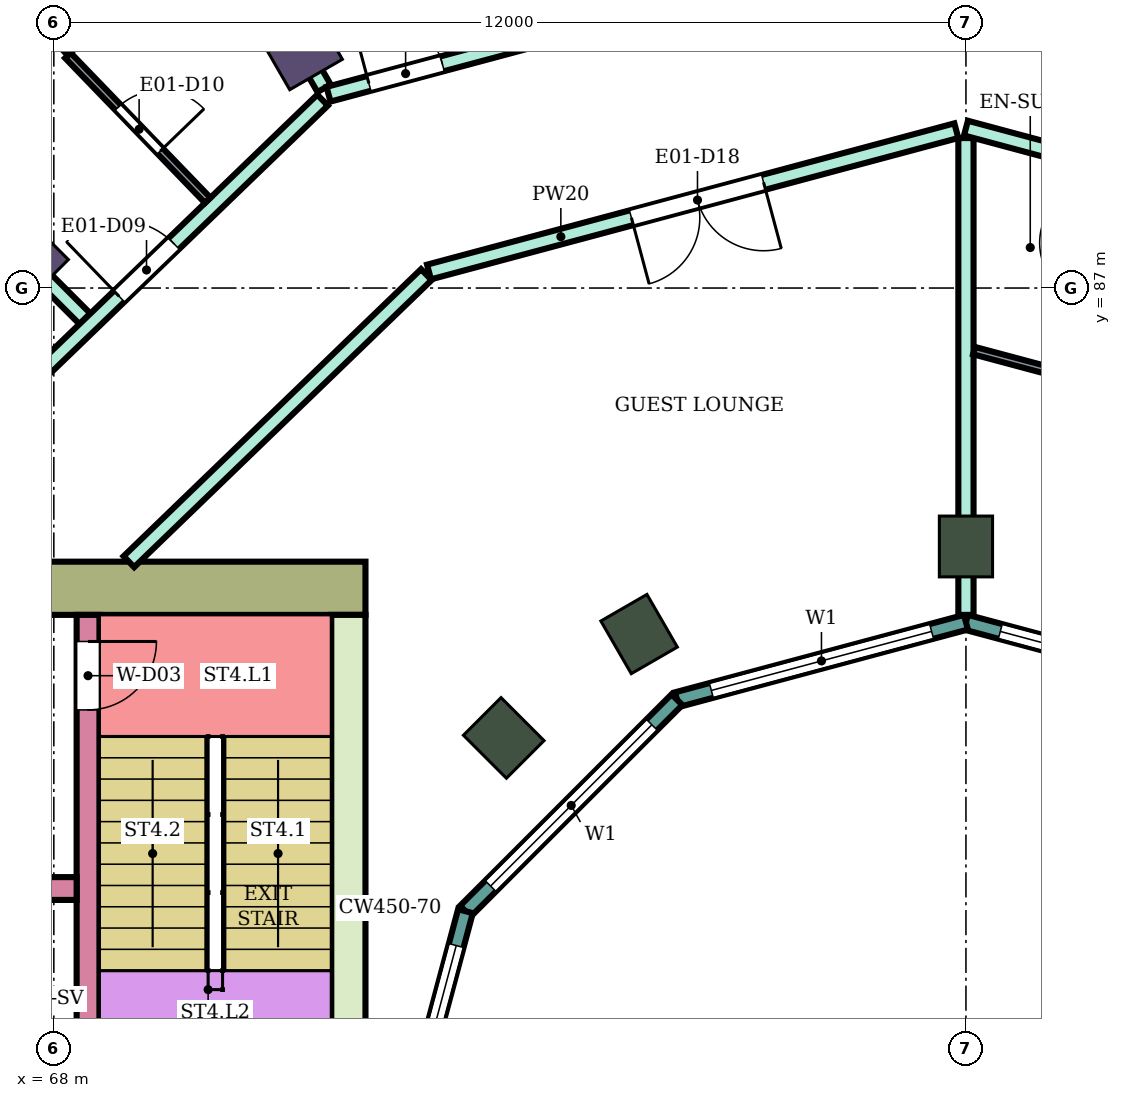
"""IFC4 building model, lengths in metres.
Left out: names, types, materials, properties, quantities, classifications, styles, units other than length and angle.
Written with IfcOpenShell. Run it as: python <this file> out.ifc"""

import sys

from ifc_helpers import new_model, si_unit, direction, frame, frame_2d, origin, origin_2d, place, context, subcontext, project, spatial, rectangle, extrude, element, fill, save


model = new_model("IFC4")
c1 = context("Model", 3, precision=1e-05, world=origin(), true_north=direction((0.0, 1.0)))
c2 = subcontext(c1, "Body", "Model", "MODEL_VIEW")
j1 = project(units=[si_unit("LENGTHUNIT", "METRE"), si_unit("PLANEANGLEUNIT", "RADIAN")], contexts=[c1])
p1 = place(None, origin())
s1 = spatial("IfcSite", under=j1, at=p1, CompositionType="ELEMENT")
p2 = place(p1, origin())
s2 = spatial("IfcBuilding", under=s1, at=p2, CompositionType="ELEMENT")
p3 = place(p2, frame((0.0, 0.0, 118.5)))
s3 = spatial("IfcBuildingStorey", under=s2, at=p3, CompositionType="ELEMENT", Elevation=118.5)
for number, where, z_axis, x_axis in (
    (1, (71.2, 90.242, 0.0), (0.0, 0.0, 1.0), (-0.5, 0.866, 0.0)),
    (2, (67.555, 87.445, 0.0), (0.0, 0.0, 1.0), (-0.707, 0.707, 0.0)),
):
    element("IfcColumn", number, at=place(p3, frame(where, z_axis=z_axis, x_axis=x_axis)), inside=s3, PredefinedType="COLUMN", context=c2, shape_type="SweptSolid", body=[
        extrude(rectangle(XDim=1.0, YDim=0.8, at=origin_2d()), origin(), (0.0, 0.0, 1.0), 3.9),
    ])
for number, where, z_axis, x_axis in (
    (3, (80.0, 83.6, 0.0), (0.0, 0.0, 1.0), (0.0, 1.0, 0.0)),
    (4, (75.7, 82.448, 0.0), (0.0, 0.0, 1.0), (-0.5, 0.866, 0.0)),
    (5, (73.919, 81.081, 0.0), (0.0, 0.0, 1.0), (-0.707, 0.707, 0.0)),
):
    element("IfcColumn", number, at=place(p3, frame(where, z_axis=z_axis, x_axis=x_axis)), inside=s3, PredefinedType="COLUMN", context=c2, shape_type="SweptSolid", body=[
        extrude(rectangle(XDim=0.8, YDim=0.7, at=origin_2d()), origin(), (0.0, 0.0, 1.0), 3.9),
    ])
p4 = place(p3, frame((72.1, 83.05, 0.0), z_axis=(0.0, 0.0, 1.0), x_axis=(-1.0, 0.0, 0.0)))
e6 = element("IfcWall", 6, at=p4, inside=s3, PredefinedType="SHEAR", context=c2, shape_type="SweptSolid", body=[
    extrude(rectangle(XDim=14.8, YDim=0.7, at=frame_2d((7.4, 0.0))), origin(), (0.0, 0.0, 1.0), 3.58),
])
p5 = place(p4, frame((4.2, 0.0, 0.0)))
e7 = element("IfcOpeningElement", 7, at=p5, cuts=e6, PredefinedType="OPENING", context=c2, shape_type="SweptSolid", body=[
    extrude(rectangle(XDim=2.4, YDim=2.4, at=frame_2d((1.2, 1.2))), frame((0.0, 0.36, 0.0), z_axis=(0.0, -1.0, 0.0), x_axis=(1.0, 0.0, 0.0)), (0.0, 0.0, 1.0), 0.72),
])
p6 = place(p3, frame((71.875, 82.7, 0.0), z_axis=(0.0, 0.0, 1.0), x_axis=(0.0, -1.0, 0.0)))
e8 = element("IfcWall", 8, at=p6, inside=s3, PredefinedType="SHEAR", context=c2, shape_type="SweptSolid", body=[
    extrude(rectangle(XDim=7.7, YDim=0.45, at=frame_2d((3.85, 0.0))), origin(), (0.0, 0.0, 1.0), 3.58),
])
p7 = place(p3, frame((68.45, 82.7, 0.0), z_axis=(0.0, 0.0, 1.0), x_axis=(0.0, -1.0, 0.0)))
e9 = element("IfcWall", 9, at=p7, inside=s3, PredefinedType="SHEAR", context=c2, shape_type="SweptSolid", body=[
    extrude(rectangle(XDim=7.7, YDim=0.3, at=frame_2d((3.85, 0.0))), origin(), (0.0, 0.0, 1.0), 3.58),
])
p8 = place(p7, frame((0.35, 0.0, 0.0)))
e10 = element("IfcOpeningElement", 10, at=p8, cuts=e9, PredefinedType="OPENING", context=c2, shape_type="SweptSolid", body=[
    extrude(rectangle(XDim=0.9, YDim=2.1, at=frame_2d((0.45, 1.05))), frame((0.0, 0.16, 0.0), z_axis=(0.0, -1.0, 0.0), x_axis=(1.0, 0.0, 0.0)), (0.0, 0.0, 1.0), 0.32),
])
p9 = place(p3, frame((68.3, 79.1, 0.0), z_axis=(0.0, 0.0, 1.0), x_axis=(-1.0, 0.0, 0.0)))
e11 = element("IfcWall", 11, at=p9, inside=s3, PredefinedType="SHEAR", context=c2, shape_type="SweptSolid", body=[
    extrude(rectangle(XDim=11.0, YDim=0.3, at=frame_2d((5.5, 0.0))), origin(), (0.0, 0.0, 1.0), 3.58),
])
p10 = place(p9, frame((0.4, 0.0, 0.0)))
e12 = element("IfcOpeningElement", 12, at=p10, cuts=e11, PredefinedType="OPENING", context=c2, shape_type="SweptSolid", body=[
    extrude(rectangle(XDim=1.4, YDim=2.1, at=frame_2d((0.7, 1.05))), frame((0.0, 0.16, 0.0), z_axis=(0.0, -1.0, 0.0), x_axis=(1.0, 0.0, 0.0)), (0.0, 0.0, 1.0), 0.32),
])
p11 = place(p9, frame((5.4, 0.0, 0.0)))
e13 = element("IfcOpeningElement", 13, at=p11, cuts=e11, PredefinedType="OPENING", context=c2, shape_type="SweptSolid", body=[
    extrude(rectangle(XDim=1.4, YDim=2.1, at=frame_2d((0.7, 1.05))), frame((0.0, 0.16, 0.0), z_axis=(0.0, -1.0, 0.0), x_axis=(1.0, 0.0, 0.0)), (0.0, 0.0, 1.0), 0.32),
])
p12 = place(p9, frame((8.1, 0.0, 0.0)))
e14 = element("IfcOpeningElement", 14, at=p12, cuts=e11, PredefinedType="OPENING", context=c2, shape_type="SweptSolid", body=[
    extrude(rectangle(XDim=1.0, YDim=2.1, at=frame_2d((0.5, 1.05))), frame((0.0, 0.16, 0.0), z_axis=(0.0, -1.0, 0.0), x_axis=(1.0, 0.0, 0.0)), (0.0, 0.0, 1.0), 0.32),
])
p13 = place(p3, frame((83.802, 81.585, 0.0), z_axis=(0.0, 0.0, 1.0), x_axis=(-0.965933654434, 0.258789828301, 0.0)))
e15 = element("IfcWall", 15, at=p13, inside=s3, PredefinedType="NOTDEFINED", context=c2, shape_type="SweptSolid", body=[
    extrude(rectangle(XDim=3.936, YDim=0.2, at=frame_2d((1.968, 0.0))), origin(), (0.0, 0.0, 1.0), 3.9),
])
p14 = place(p13, frame((0.468, 0.0, 0.9)))
e16 = element("IfcOpeningElement", 16, at=p14, cuts=e15, PredefinedType="OPENING", context=c2, shape_type="SweptSolid", body=[
    extrude(rectangle(XDim=3.0, YDim=2.3, at=frame_2d((1.5, 1.15))), frame((0.0, 0.11, 0.0), z_axis=(0.0, -1.0, 0.0), x_axis=(1.0, 0.0, 0.0)), (0.0, 0.0, 1.0), 0.22),
])
p15 = place(p3, frame((80.0, 82.604, 0.0), z_axis=(0.0, 0.0, 1.0), x_axis=(-0.965933654434, -0.258789828301, 0.0)))
e17 = element("IfcWall", 17, at=p15, inside=s3, PredefinedType="NOTDEFINED", context=c2, shape_type="SweptSolid", body=[
    extrude(rectangle(XDim=3.936, YDim=0.2, at=frame_2d((1.968, 0.0))), origin(), (0.0, 0.0, 1.0), 3.9),
])
p16 = place(p15, frame((0.468, 0.0, 0.9)))
e18 = element("IfcOpeningElement", 18, at=p16, cuts=e17, PredefinedType="OPENING", context=c2, shape_type="SweptSolid", body=[
    extrude(rectangle(XDim=3.0, YDim=2.3, at=frame_2d((1.5, 1.15))), frame((0.0, 0.11, 0.0), z_axis=(0.0, -1.0, 0.0), x_axis=(1.0, 0.0, 0.0)), (0.0, 0.0, 1.0), 0.22),
])
p17 = place(p3, frame((76.198, 81.585, 0.0), z_axis=(0.0, 0.0, 1.0), x_axis=(-0.707106781187, -0.707106781187, 0.0)))
e19 = element("IfcWall", 19, at=p17, inside=s3, PredefinedType="NOTDEFINED", context=c2, shape_type="SweptSolid", body=[
    extrude(rectangle(XDim=3.936, YDim=0.2, at=frame_2d((1.968, 0.0))), origin(), (0.0, 0.0, 1.0), 3.9),
])
p18 = place(p17, frame((0.468, 0.0, 0.9)))
e20 = element("IfcOpeningElement", 20, at=p18, cuts=e19, PredefinedType="OPENING", context=c2, shape_type="SweptSolid", body=[
    extrude(rectangle(XDim=3.0, YDim=2.3, at=frame_2d((1.5, 1.15))), frame((0.0, 0.11, 0.0), z_axis=(0.0, -1.0, 0.0), x_axis=(1.0, 0.0, 0.0)), (0.0, 0.0, 1.0), 0.22),
])
p19 = place(p3, frame((73.415, 78.802, 0.0), z_axis=(0.0, 0.0, 1.0), x_axis=(-0.258789828301, -0.965933654434, 0.0)))
e21 = element("IfcWall", 21, at=p19, inside=s3, PredefinedType="NOTDEFINED", context=c2, shape_type="SweptSolid", body=[
    extrude(rectangle(XDim=3.936, YDim=0.2, at=frame_2d((1.968, 0.0))), origin(), (0.0, 0.0, 1.0), 3.9),
])
p20 = place(p19, frame((0.468, 0.0, 0.9)))
e22 = element("IfcOpeningElement", 22, at=p20, cuts=e21, PredefinedType="OPENING", context=c2, shape_type="SweptSolid", body=[
    extrude(rectangle(XDim=3.0, YDim=2.3, at=frame_2d((1.5, 1.15))), frame((0.0, 0.11, 0.0), z_axis=(0.0, -1.0, 0.0), x_axis=(1.0, 0.0, 0.0)), (0.0, 0.0, 1.0), 0.22),
])
p21 = place(p3, frame((63.598, 91.408, 0.0), z_axis=(0.0, 0.0, 1.0), x_axis=(0.706963264491, -0.707250268759, 0.0)))
e23 = element("IfcWall", 23, at=p21, inside=s3, PredefinedType="PARTITIONING", context=c2, shape_type="SweptSolid", body=[
    extrude(rectangle(XDim=6.805, YDim=0.2, at=frame_2d((3.403, 0.0))), origin(), (0.0, 0.0, 1.0), 3.45),
])
p22 = place(p3, frame((66.797, 84.9, 0.0), z_axis=(0.0, 0.0, 1.0), x_axis=(0.719692092412, 0.694293376116, 0.0)))
e24 = element("IfcWall", 24, at=p22, inside=s3, PredefinedType="PARTITIONING", context=c2, shape_type="SweptSolid", body=[
    extrude(rectangle(XDim=6.584, YDim=0.2, at=frame_2d((3.292, 0.0))), origin(), (0.0, 0.0, 1.0), 3.45),
])
p23 = place(p22, frame((2.866, 0.0, 0.0)))
e25 = element("IfcOpeningElement", 25, at=p23, cuts=e24, PredefinedType="OPENING", context=c2, shape_type="SweptSolid", body=[
    extrude(rectangle(XDim=1.0, YDim=2.1, at=frame_2d((0.5, 1.05))), frame((0.0, 0.11, 0.0), z_axis=(0.0, -1.0, 0.0), x_axis=(1.0, 0.0, 0.0)), (0.0, 0.0, 1.0), 0.22),
])
p24 = place(p3, frame((67.102, 97.342, 0.0), z_axis=(0.0, 0.0, 1.0), x_axis=(0.499927298089, -0.866067374183, 0.0)))
e26 = element("IfcWall", 26, at=p24, inside=s3, PredefinedType="PARTITIONING", context=c2, shape_type="SweptSolid", body=[
    extrude(rectangle(XDim=8.907, YDim=0.2, at=frame_2d((4.454, 0.0))), origin(), (0.0, 0.0, 1.0), 3.45),
])
p25 = place(p3, frame((68.987, 83.4, 0.0), z_axis=(0.0, 0.0, 1.0), x_axis=(0.719586298962, 0.694403022997, 0.0)))
e27 = element("IfcWall", 27, at=p25, inside=s3, PredefinedType="PARTITIONING", context=c2, shape_type="SweptSolid", body=[
    extrude(rectangle(XDim=5.439, YDim=0.2, at=frame_2d((2.719, 0.0))), origin(), (0.0, 0.0, 1.0), 3.45),
])
p26 = place(p3, frame((71.614, 89.55, 0.0), z_axis=(0.0, 0.0, 1.0), x_axis=(0.965967958589, 0.258661753994, 0.0)))
e28 = element("IfcWall", 28, at=p26, inside=s3, PredefinedType="PARTITIONING", context=c2, shape_type="SweptSolid", body=[
    extrude(rectangle(XDim=8.592, YDim=0.2, at=frame_2d((4.296, 0.0))), origin(), (0.0, 0.0, 1.0), 3.45),
])
p27 = place(p26, frame((0.55, 0.0, 0.0)))
e29 = element("IfcOpeningElement", 29, at=p27, cuts=e28, PredefinedType="OPENING", context=c2, shape_type="SweptSolid", body=[
    extrude(rectangle(XDim=1.0, YDim=2.1, at=frame_2d((0.5, 1.05))), frame((0.0, 0.11, 0.0), z_axis=(0.0, -1.0, 0.0), x_axis=(1.0, 0.0, 0.0)), (0.0, 0.0, 1.0), 0.22),
])
p28 = place(p3, frame((72.936, 87.211, 0.0), z_axis=(0.0, 0.0, 1.0), x_axis=(0.965917703859, 0.258849356521, 0.0)))
e30 = element("IfcWall", 30, at=p28, inside=s3, PredefinedType="PARTITIONING", context=c2, shape_type="SweptSolid", body=[
    extrude(rectangle(XDim=7.182, YDim=0.2, at=frame_2d((3.591, 0.0))), origin(), (0.0, 0.0, 1.0), 3.45),
])
p29 = place(p28, frame((2.757, 0.0, 0.0)))
e31 = element("IfcOpeningElement", 31, at=p29, cuts=e30, PredefinedType="OPENING", context=c2, shape_type="SweptSolid", body=[
    extrude(rectangle(XDim=1.8, YDim=2.1, at=frame_2d((0.9, 1.05))), frame((0.0, 0.11, 0.0), z_axis=(0.0, -1.0, 0.0), x_axis=(1.0, 0.0, 0.0)), (0.0, 0.0, 1.0), 0.22),
])
p30 = place(p3, frame((80.0, 82.7, 0.0), z_axis=(0.0, 0.0, 1.0), x_axis=(0.0, 1.0, 0.0)))
e32 = element("IfcWall", 32, at=p30, inside=s3, PredefinedType="PARTITIONING", context=c2, shape_type="SweptSolid", body=[
    extrude(rectangle(XDim=6.273, YDim=0.2, at=frame_2d((3.136, 0.0))), origin(), (0.0, 0.0, 1.0), 3.45),
])
p31 = place(p3, frame((80.0, 89.104, 0.0), z_axis=(0.0, 0.0, 1.0), x_axis=(0.965856548257, -0.259077455964, 0.0)))
e33 = element("IfcWall", 33, at=p31, inside=s3, PredefinedType="PARTITIONING", context=c2, shape_type="SweptSolid", body=[
    extrude(rectangle(XDim=7.173, YDim=0.2, at=frame_2d((3.586, 0.0))), origin(), (0.0, 0.0, 1.0), 3.45),
])
p32 = place(p31, frame((5.763, 0.0, 0.0)))
e34 = element("IfcOpeningElement", 34, at=p32, cuts=e33, PredefinedType="OPENING", context=c2, shape_type="SweptSolid", body=[
    extrude(rectangle(XDim=1.0, YDim=2.1, at=frame_2d((0.5, 1.05))), frame((0.0, 0.11, 0.0), z_axis=(0.0, -1.0, 0.0), x_axis=(1.0, 0.0, 0.0)), (0.0, 0.0, 1.0), 0.22),
])
p33 = place(p3, frame((80.0, 91.797, 0.0), z_axis=(0.0, 0.0, 1.0), x_axis=(0.965857042792, -0.259075612301, 0.0)))
e35 = element("IfcWall", 35, at=p33, inside=s3, PredefinedType="PARTITIONING", context=c2, shape_type="SweptSolid", body=[
    extrude(rectangle(XDim=8.602, YDim=0.2, at=frame_2d((4.301, 0.0))), origin(), (0.0, 0.0, 1.0), 3.45),
])
p34 = place(p33, frame((4.877, 0.0, 0.0)))
e36 = element("IfcOpeningElement", 36, at=p34, cuts=e35, PredefinedType="OPENING", context=c2, shape_type="SweptSolid", body=[
    extrude(rectangle(XDim=1.0, YDim=2.1, at=frame_2d((0.5, 1.05))), frame((0.0, 0.11, 0.0), z_axis=(0.0, -1.0, 0.0), x_axis=(1.0, 0.0, 0.0)), (0.0, 0.0, 1.0), 0.22),
])
p35 = place(p33, frame((2.817, 0.0, 0.0)))
e37 = element("IfcOpeningElement", 37, at=p35, cuts=e35, PredefinedType="OPENING", context=c2, shape_type="SweptSolid", body=[
    extrude(rectangle(XDim=1.0, YDim=2.1, at=frame_2d((0.5, 1.05))), frame((0.0, 0.11, 0.0), z_axis=(0.0, -1.0, 0.0), x_axis=(1.0, 0.0, 0.0)), (0.0, 0.0, 1.0), 0.22),
])
p36 = place(p3, frame((68.185, 90.06, 0.0), z_axis=(0.0, 0.0, 1.0), x_axis=(0.69446127412, -0.719530081892, 0.0)))
e38 = element("IfcWall", 38, at=p36, inside=s3, PredefinedType="PARTITIONING", context=c2, shape_type="SweptSolid", body=[
    extrude(rectangle(XDim=2.649, YDim=0.1, at=frame_2d((1.324, 0.0))), origin(), (0.0, 0.0, 1.0), 3.45),
])
p37 = place(p36, frame((0.95, 0.0, 0.0)))
e39 = element("IfcOpeningElement", 39, at=p37, cuts=e38, PredefinedType="OPENING", context=c2, shape_type="SweptSolid", body=[
    extrude(rectangle(XDim=0.8, YDim=2.1, at=frame_2d((0.4, 1.05))), frame((0.0, 0.06, 0.0), z_axis=(0.0, -1.0, 0.0), x_axis=(1.0, 0.0, 0.0)), (0.0, 0.0, 1.0), 0.12),
])
p38 = place(p3, frame((68.15, 90.096, 0.0), z_axis=(0.0, 0.0, 1.0), x_axis=(0.719667544954, 0.694318820672, 0.0)))
e40 = element("IfcWall", 40, at=p38, inside=s3, PredefinedType="PARTITIONING", context=c2, shape_type="SweptSolid", body=[
    extrude(rectangle(XDim=2.687, YDim=0.1, at=frame_2d((1.344, 0.0))), origin(), (0.0, 0.0, 1.0), 3.45),
])
p39 = place(p3, frame((80.106, 86.177, 0.0), z_axis=(0.0, 0.0, 1.0), x_axis=(0.966002973184, -0.258530957139, 0.0)))
e41 = element("IfcWall", 41, at=p39, inside=s3, PredefinedType="PARTITIONING", context=c2, shape_type="SweptSolid", body=[
    extrude(rectangle(XDim=1.19, YDim=0.1, at=frame_2d((0.595, 0.0))), origin(), (0.0, 0.0, 1.0), 3.45),
])
p40 = place(p14, origin())
e42 = element("IfcWindow", 42, at=p40, inside=s3, PartitioningType="SINGLE_PANEL", PredefinedType="WINDOW", context=c2, shape_type="SweptSolid", body=[
    extrude(rectangle(XDim=3.0, YDim=2.3, at=frame_2d((1.5, 1.15))), frame((0.0, 0.03, 0.0), z_axis=(0.0, -1.0, 0.0), x_axis=(1.0, 0.0, 0.0)), (0.0, 0.0, 1.0), 0.06),
])
fill(e16, e42)
p41 = place(p16, origin())
e43 = element("IfcWindow", 43, at=p41, inside=s3, PartitioningType="SINGLE_PANEL", PredefinedType="WINDOW", context=c2, shape_type="SweptSolid", body=[
    extrude(rectangle(XDim=3.0, YDim=2.3, at=frame_2d((1.5, 1.15))), frame((0.0, 0.03, 0.0), z_axis=(0.0, -1.0, 0.0), x_axis=(1.0, 0.0, 0.0)), (0.0, 0.0, 1.0), 0.06),
])
fill(e18, e43)
p42 = place(p18, origin())
e44 = element("IfcWindow", 44, at=p42, inside=s3, PartitioningType="SINGLE_PANEL", PredefinedType="WINDOW", context=c2, shape_type="SweptSolid", body=[
    extrude(rectangle(XDim=3.0, YDim=2.3, at=frame_2d((1.5, 1.15))), frame((0.0, 0.03, 0.0), z_axis=(0.0, -1.0, 0.0), x_axis=(1.0, 0.0, 0.0)), (0.0, 0.0, 1.0), 0.06),
])
fill(e20, e44)
p43 = place(p20, origin())
e45 = element("IfcWindow", 45, at=p43, inside=s3, PartitioningType="SINGLE_PANEL", PredefinedType="WINDOW", context=c2, shape_type="SweptSolid", body=[
    extrude(rectangle(XDim=3.0, YDim=2.3, at=frame_2d((1.5, 1.15))), frame((0.0, 0.03, 0.0), z_axis=(0.0, -1.0, 0.0), x_axis=(1.0, 0.0, 0.0)), (0.0, 0.0, 1.0), 0.06),
])
fill(e22, e45)
p44 = place(p27, origin())
e46 = element("IfcDoor", 46, at=p44, inside=s3, OperationType="SINGLE_SWING_LEFT", PredefinedType="DOOR", context=c2, shape_type="SweptSolid", body=[
    extrude(rectangle(XDim=1.0, YDim=2.1, at=frame_2d((0.5, 1.05))), frame((0.0, 0.025, 0.0), z_axis=(0.0, -1.0, 0.0), x_axis=(1.0, 0.0, 0.0)), (0.0, 0.0, 1.0), 0.05),
])
fill(e29, e46)
p45 = place(p23, origin())
e47 = element("IfcDoor", 47, at=p45, inside=s3, OperationType="SINGLE_SWING_LEFT", PredefinedType="DOOR", context=c2, shape_type="SweptSolid", body=[
    extrude(rectangle(XDim=1.0, YDim=2.1, at=frame_2d((0.5, 1.05))), frame((0.0, 0.025, 0.0), z_axis=(0.0, -1.0, 0.0), x_axis=(1.0, 0.0, 0.0)), (0.0, 0.0, 1.0), 0.05),
])
fill(e25, e47)
p46 = place(p37, origin())
e48 = element("IfcDoor", 48, at=p46, inside=s3, OperationType="SINGLE_SWING_RIGHT", PredefinedType="DOOR", context=c2, shape_type="SweptSolid", body=[
    extrude(rectangle(XDim=0.8, YDim=2.1, at=frame_2d((0.4, 1.05))), frame((0.0, 0.025, 0.0), z_axis=(0.0, -1.0, 0.0), x_axis=(1.0, 0.0, 0.0)), (0.0, 0.0, 1.0), 0.05),
])
fill(e39, e48)
p47 = place(p29, frame((1.8, 0.0, 0.0), z_axis=(0.0, 0.0, 1.0), x_axis=(-1.0, 0.0, 0.0)))
e49 = element("IfcDoor", 49, at=p47, inside=s3, OperationType="DOUBLE_DOOR_SINGLE_SWING", PredefinedType="DOOR", context=c2, shape_type="SweptSolid", body=[
    extrude(rectangle(XDim=1.8, YDim=2.1, at=frame_2d((0.9, 1.05))), frame((0.0, 0.025, 0.0), z_axis=(0.0, -1.0, 0.0), x_axis=(1.0, 0.0, 0.0)), (0.0, 0.0, 1.0), 0.05),
])
fill(e31, e49)
p48 = place(p8, origin())
e50 = element("IfcDoor", 50, at=p48, inside=s3, OperationType="SINGLE_SWING_LEFT", PredefinedType="DOOR", context=c2, shape_type="SweptSolid", body=[
    extrude(rectangle(XDim=0.9, YDim=2.1, at=frame_2d((0.45, 1.05))), frame((0.0, 0.025, 0.0), z_axis=(0.0, -1.0, 0.0), x_axis=(1.0, 0.0, 0.0)), (0.0, 0.0, 1.0), 0.05),
])
fill(e10, e50)
save(model, sys.argv[1])
